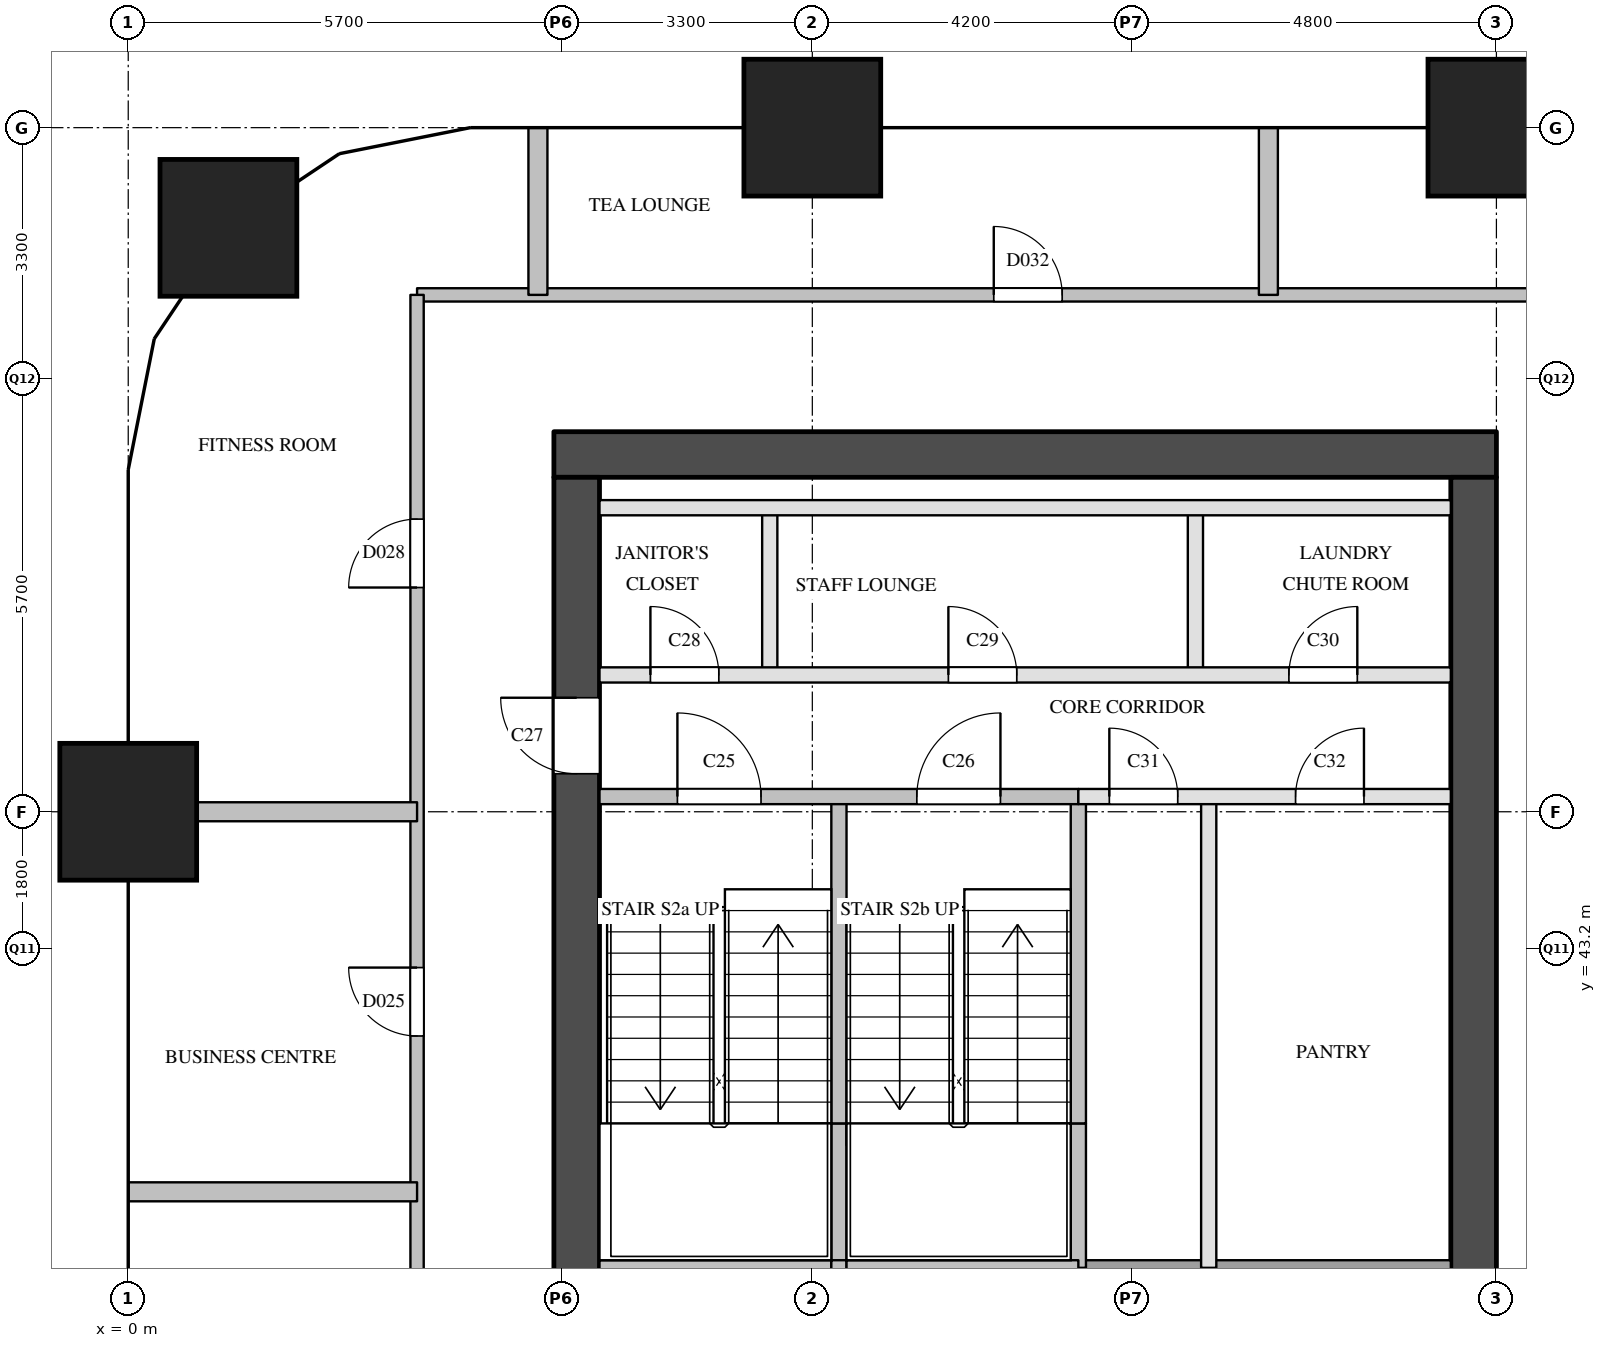
"""IFC4 building model, lengths in metres.
Left out: names, types, materials, properties, quantities, classifications, styles, units other than length and angle.
Written with IfcOpenShell. Run it as: python <this file> out.ifc"""

import sys

from ifc_helpers import new_model, si_unit, direction, frame, frame_2d, origin, origin_2d, place, context, subcontext, project, spatial, rectangle, extrude, element, fill, save


model = new_model("IFC4")
c1 = context("Model", 3, precision=1e-05, world=origin(), true_north=direction((0.0, 1.0)))
c2 = subcontext(c1, "Body", "Model", "MODEL_VIEW")
j1 = project(units=[si_unit("LENGTHUNIT", "METRE"), si_unit("PLANEANGLEUNIT", "RADIAN")], contexts=[c1])
p1 = place(None, origin())
s1 = spatial("IfcSite", under=j1, at=p1, CompositionType="ELEMENT")
p2 = place(p1, origin())
s2 = spatial("IfcBuilding", under=s1, at=p2, CompositionType="ELEMENT")
p3 = place(p2, frame((0.0, 0.0, 119.6)))
s3 = spatial("IfcBuildingStorey", under=s2, at=p3, CompositionType="ELEMENT", Elevation=119.6)
for number, where, z_axis, x_axis in (
    (1, (0.0, 45.0, 0.0), (0.0, 0.0, 1.0), (1.0, 0.0, 0.0)),
    (2, (1.318, 52.682, 0.0), (0.0, 0.0, 1.0), (1.0, 0.0, 0.0)),
    (3, (9.0, 54.0, 0.0), (0.0, 0.0, 1.0), (1.0, 0.0, 0.0)),
    (4, (18.0, 54.0, 0.0), (0.0, 0.0, 1.0), (1.0, 0.0, 0.0)),
):
    element("IfcColumn", number, at=place(p3, frame(where, z_axis=z_axis, x_axis=x_axis)), inside=s3, PredefinedType="COLUMN", context=c2, shape_type="SweptSolid", body=[
        extrude(rectangle(XDim=1.8, YDim=1.8, at=origin_2d()), origin(), (0.0, 0.0, 1.0), 3.8),
    ])
p4 = place(p3, frame((5.6, 49.7, 0.0), z_axis=(0.0, 0.0, 1.0), x_axis=(1.0, 0.0, 0.0)))
e5 = element("IfcWall", 5, at=p4, inside=s3, PredefinedType="SHEAR", context=c2, shape_type="SweptSolid", body=[
    extrude(rectangle(XDim=12.4, YDim=0.6, at=frame_2d((6.2, 0.0))), origin(), (0.0, 0.0, 1.0), 3.3),
])
p5 = place(p3, frame((5.9, 29.1, 0.0), z_axis=(0.0, 0.0, 1.0), x_axis=(0.0, 1.0, 0.0)))
e6 = element("IfcWall", 6, at=p5, inside=s3, PredefinedType="SHEAR", context=c2, shape_type="SweptSolid", body=[
    extrude(rectangle(XDim=20.3, YDim=0.6, at=frame_2d((10.15, 0.0))), origin(), (0.0, 0.0, 1.0), 3.3),
])
p6 = place(p5, frame((3.6, 0.0, 0.0)))
e7 = element("IfcOpeningElement", 7, at=p6, cuts=e6, PredefinedType="OPENING", context=c2, shape_type="SweptSolid", body=[
    extrude(rectangle(XDim=1.8, YDim=2.1, at=frame_2d((0.9, 1.05))), frame((0.0, 0.31, 0.0), z_axis=(0.0, -1.0, 0.0), x_axis=(1.0, 0.0, 0.0)), (0.0, 0.0, 1.0), 0.62),
])
p7 = place(p5, frame((16.4, 0.0, 0.0)))
e8 = element("IfcOpeningElement", 8, at=p7, cuts=e6, PredefinedType="OPENING", context=c2, shape_type="SweptSolid", body=[
    extrude(rectangle(XDim=1.0, YDim=2.1, at=frame_2d((0.5, 1.05))), frame((0.0, 0.31, 0.0), z_axis=(0.0, -1.0, 0.0), x_axis=(1.0, 0.0, 0.0)), (0.0, 0.0, 1.0), 0.62),
])
p8 = place(p3, frame((17.7, 29.1, 0.0), z_axis=(0.0, 0.0, 1.0), x_axis=(0.0, 1.0, 0.0)))
e9 = element("IfcWall", 9, at=p8, inside=s3, PredefinedType="SHEAR", context=c2, shape_type="SweptSolid", body=[
    extrude(rectangle(XDim=20.3, YDim=0.6, at=frame_2d((10.15, 0.0))), origin(), (0.0, 0.0, 1.0), 3.3),
])
p9 = place(p8, frame((1.25, 0.0, 0.0)))
e10 = element("IfcOpeningElement", 10, at=p9, cuts=e9, PredefinedType="OPENING", context=c2, shape_type="SweptSolid", body=[
    extrude(rectangle(XDim=0.7, YDim=2.1, at=frame_2d((0.35, 1.05))), frame((0.0, 0.31, 0.0), z_axis=(0.0, -1.0, 0.0), x_axis=(1.0, 0.0, 0.0)), (0.0, 0.0, 1.0), 0.62),
])
p10 = place(p8, frame((7.05, 0.0, 0.0)))
e11 = element("IfcOpeningElement", 11, at=p10, cuts=e9, PredefinedType="OPENING", context=c2, shape_type="SweptSolid", body=[
    extrude(rectangle(XDim=0.7, YDim=2.1, at=frame_2d((0.35, 1.05))), frame((0.0, 0.31, 0.0), z_axis=(0.0, -1.0, 0.0), x_axis=(1.0, 0.0, 0.0)), (0.0, 0.0, 1.0), 0.62),
])
p11 = place(p3, frame((8.44, 46.8, 0.0), z_axis=(0.0, 0.0, 1.0), x_axis=(0.0, 1.0, 0.0)))
e12 = element("IfcWall", 12, at=p11, inside=s3, PredefinedType="PARTITIONING", context=c2, shape_type="SweptSolid", body=[
    extrude(rectangle(XDim=2.2, YDim=0.2, at=frame_2d((1.1, 0.0))), origin(), (0.0, 0.0, 1.0), 3.3),
])
p12 = place(p3, frame((9.35, 39.0, 0.0), z_axis=(0.0, 0.0, 1.0), x_axis=(0.0, 1.0, 0.0)))
e13 = element("IfcWall", 13, at=p12, inside=s3, PredefinedType="SOLIDWALL", context=c2, shape_type="SweptSolid", body=[
    extrude(rectangle(XDim=1.9, YDim=0.2, at=frame_2d((0.95, 0.0))), origin(), (0.0, 0.0, 1.0), 3.3),
])
p13 = place(p3, frame((9.35, 40.9, 0.0), z_axis=(0.0, 0.0, 1.0), x_axis=(0.0, 1.0, 0.0)))
e14 = element("IfcWall", 14, at=p13, inside=s3, PredefinedType="SOLIDWALL", context=c2, shape_type="SweptSolid", body=[
    extrude(rectangle(XDim=4.3, YDim=0.2, at=frame_2d((2.15, 0.0))), origin(), (0.0, 0.0, 1.0), 3.3),
])
p14 = place(p3, frame((12.5, 39.0, 0.0), z_axis=(0.0, 0.0, 1.0), x_axis=(0.0, 1.0, 0.0)))
e15 = element("IfcWall", 15, at=p14, inside=s3, PredefinedType="SOLIDWALL", context=c2, shape_type="SweptSolid", body=[
    extrude(rectangle(XDim=1.9, YDim=0.2, at=frame_2d((0.95, 0.0))), origin(), (0.0, 0.0, 1.0), 3.3),
])
p15 = place(p3, frame((12.5, 40.9, 0.0), z_axis=(0.0, 0.0, 1.0), x_axis=(0.0, 1.0, 0.0)))
e16 = element("IfcWall", 16, at=p15, inside=s3, PredefinedType="SOLIDWALL", context=c2, shape_type="SweptSolid", body=[
    extrude(rectangle(XDim=4.3, YDim=0.2, at=frame_2d((2.15, 0.0))), origin(), (0.0, 0.0, 1.0), 3.3),
])
p16 = place(p3, frame((14.04, 46.8, 0.0), z_axis=(0.0, 0.0, 1.0), x_axis=(0.0, 1.0, 0.0)))
e17 = element("IfcWall", 17, at=p16, inside=s3, PredefinedType="PARTITIONING", context=c2, shape_type="SweptSolid", body=[
    extrude(rectangle(XDim=2.2, YDim=0.2, at=frame_2d((1.1, 0.0))), origin(), (0.0, 0.0, 1.0), 3.3),
])
p17 = place(p3, frame((14.215, 39.0, 0.0), z_axis=(0.0, 0.0, 1.0), x_axis=(0.0, 1.0, 0.0)))
e18 = element("IfcWall", 18, at=p17, inside=s3, PredefinedType="PARTITIONING", context=c2, shape_type="SweptSolid", body=[
    extrude(rectangle(XDim=6.2, YDim=0.2, at=frame_2d((3.1, 0.0))), origin(), (0.0, 0.0, 1.0), 3.3),
])
p18 = place(p3, frame((12.5, 39.0, 0.0), z_axis=(0.0, 0.0, 1.0), x_axis=(1.0, 0.0, 0.0)))
e19 = element("IfcWall", 19, at=p18, inside=s3, PredefinedType="SOLIDWALL", context=c2, shape_type="SweptSolid", body=[
    extrude(rectangle(XDim=4.9, YDim=0.2, at=frame_2d((2.45, 0.0))), origin(), (0.0, 0.0, 1.0), 3.3),
])
p19 = place(p3, frame((6.2, 39.0, 0.0), z_axis=(0.0, 0.0, 1.0), x_axis=(1.0, 0.0, 0.0)))
e20 = element("IfcWall", 20, at=p19, inside=s3, PredefinedType="SOLIDWALL", context=c2, shape_type="SweptSolid", body=[
    extrude(rectangle(XDim=3.05, YDim=0.2, at=frame_2d((1.525, 0.0))), origin(), (0.0, 0.0, 1.0), 3.3),
])
p20 = place(p3, frame((9.25, 39.0, 0.0), z_axis=(0.0, 0.0, 1.0), x_axis=(1.0, 0.0, 0.0)))
e21 = element("IfcWall", 21, at=p20, inside=s3, PredefinedType="SOLIDWALL", context=c2, shape_type="SweptSolid", body=[
    extrude(rectangle(XDim=0.2, YDim=0.2, at=frame_2d((0.1, 0.0))), origin(), (0.0, 0.0, 1.0), 3.3),
])
p21 = place(p3, frame((9.45, 39.0, 0.0), z_axis=(0.0, 0.0, 1.0), x_axis=(1.0, 0.0, 0.0)))
e22 = element("IfcWall", 22, at=p21, inside=s3, PredefinedType="SOLIDWALL", context=c2, shape_type="SweptSolid", body=[
    extrude(rectangle(XDim=3.05, YDim=0.2, at=frame_2d((1.525, 0.0))), origin(), (0.0, 0.0, 1.0), 3.3),
])
p22 = place(p3, frame((12.5, 45.2, 0.0), z_axis=(0.0, 0.0, 1.0), x_axis=(1.0, 0.0, 0.0)))
e23 = element("IfcWall", 23, at=p22, inside=s3, PredefinedType="PARTITIONING", context=c2, shape_type="SweptSolid", body=[
    extrude(rectangle(XDim=4.9, YDim=0.2, at=frame_2d((2.45, 0.0))), origin(), (0.0, 0.0, 1.0), 3.3),
])
p23 = place(p22, frame((0.407, 0.0, 0.0)))
e24 = element("IfcOpeningElement", 24, at=p23, cuts=e23, PredefinedType="OPENING", context=c2, shape_type="SweptSolid", body=[
    extrude(rectangle(XDim=0.9, YDim=2.1, at=frame_2d((0.45, 1.05))), frame((0.0, 0.11, 0.0), z_axis=(0.0, -1.0, 0.0), x_axis=(1.0, 0.0, 0.0)), (0.0, 0.0, 1.0), 0.22),
])
p24 = place(p22, frame((2.857, 0.0, 0.0)))
e25 = element("IfcOpeningElement", 25, at=p24, cuts=e23, PredefinedType="OPENING", context=c2, shape_type="SweptSolid", body=[
    extrude(rectangle(XDim=0.9, YDim=2.1, at=frame_2d((0.45, 1.05))), frame((0.0, 0.11, 0.0), z_axis=(0.0, -1.0, 0.0), x_axis=(1.0, 0.0, 0.0)), (0.0, 0.0, 1.0), 0.22),
])
p25 = place(p3, frame((6.2, 45.2, 0.0), z_axis=(0.0, 0.0, 1.0), x_axis=(1.0, 0.0, 0.0)))
e26 = element("IfcWall", 26, at=p25, inside=s3, PredefinedType="SOLIDWALL", context=c2, shape_type="SweptSolid", body=[
    extrude(rectangle(XDim=6.3, YDim=0.2, at=frame_2d((3.15, 0.0))), origin(), (0.0, 0.0, 1.0), 3.3),
])
p26 = place(p25, frame((1.025, 0.0, 0.0)))
e27 = element("IfcOpeningElement", 27, at=p26, cuts=e26, PredefinedType="OPENING", context=c2, shape_type="SweptSolid", body=[
    extrude(rectangle(XDim=1.1, YDim=2.1, at=frame_2d((0.55, 1.05))), frame((0.0, 0.11, 0.0), z_axis=(0.0, -1.0, 0.0), x_axis=(1.0, 0.0, 0.0)), (0.0, 0.0, 1.0), 0.22),
])
p27 = place(p25, frame((4.175, 0.0, 0.0)))
e28 = element("IfcOpeningElement", 28, at=p27, cuts=e26, PredefinedType="OPENING", context=c2, shape_type="SweptSolid", body=[
    extrude(rectangle(XDim=1.1, YDim=2.1, at=frame_2d((0.55, 1.05))), frame((0.0, 0.11, 0.0), z_axis=(0.0, -1.0, 0.0), x_axis=(1.0, 0.0, 0.0)), (0.0, 0.0, 1.0), 0.22),
])
p28 = place(p3, frame((6.2, 46.8, 0.0), z_axis=(0.0, 0.0, 1.0), x_axis=(1.0, 0.0, 0.0)))
e29 = element("IfcWall", 29, at=p28, inside=s3, PredefinedType="PARTITIONING", context=c2, shape_type="SweptSolid", body=[
    extrude(rectangle(XDim=11.2, YDim=0.2, at=frame_2d((5.6, 0.0))), origin(), (0.0, 0.0, 1.0), 3.3),
])
p29 = place(p28, frame((0.67, 0.0, 0.0)))
e30 = element("IfcOpeningElement", 30, at=p29, cuts=e29, PredefinedType="OPENING", context=c2, shape_type="SweptSolid", body=[
    extrude(rectangle(XDim=0.9, YDim=2.1, at=frame_2d((0.45, 1.05))), frame((0.0, 0.11, 0.0), z_axis=(0.0, -1.0, 0.0), x_axis=(1.0, 0.0, 0.0)), (0.0, 0.0, 1.0), 0.22),
])
p30 = place(p28, frame((4.59, 0.0, 0.0)))
e31 = element("IfcOpeningElement", 31, at=p30, cuts=e29, PredefinedType="OPENING", context=c2, shape_type="SweptSolid", body=[
    extrude(rectangle(XDim=0.9, YDim=2.1, at=frame_2d((0.45, 1.05))), frame((0.0, 0.11, 0.0), z_axis=(0.0, -1.0, 0.0), x_axis=(1.0, 0.0, 0.0)), (0.0, 0.0, 1.0), 0.22),
])
p31 = place(p28, frame((9.07, 0.0, 0.0)))
e32 = element("IfcOpeningElement", 32, at=p31, cuts=e29, PredefinedType="OPENING", context=c2, shape_type="SweptSolid", body=[
    extrude(rectangle(XDim=0.9, YDim=2.1, at=frame_2d((0.45, 1.05))), frame((0.0, 0.11, 0.0), z_axis=(0.0, -1.0, 0.0), x_axis=(1.0, 0.0, 0.0)), (0.0, 0.0, 1.0), 0.22),
])
p32 = place(p3, frame((6.2, 49.0, 0.0), z_axis=(0.0, 0.0, 1.0), x_axis=(1.0, 0.0, 0.0)))
e33 = element("IfcWall", 33, at=p32, inside=s3, PredefinedType="PARTITIONING", context=c2, shape_type="SweptSolid", body=[
    extrude(rectangle(XDim=11.2, YDim=0.2, at=frame_2d((5.6, 0.0))), origin(), (0.0, 0.0, 1.0), 3.3),
])
p33 = place(p3, frame((3.8, 51.8, 0.0), z_axis=(0.0, 0.0, 1.0), x_axis=(1.0, 0.0, 0.0)))
e34 = element("IfcWall", 34, at=p33, inside=s3, PredefinedType="PARTITIONING", context=c2, shape_type="SweptSolid", body=[
    extrude(rectangle(XDim=16.0, YDim=0.175, at=frame_2d((8.0, 0.0))), origin(), (0.0, 0.0, 1.0), 3.3),
])
p34 = place(p33, frame((7.587, 0.0, 0.0)))
e35 = element("IfcOpeningElement", 35, at=p34, cuts=e34, PredefinedType="OPENING", context=c2, shape_type="SweptSolid", body=[
    extrude(rectangle(XDim=0.9, YDim=2.1, at=frame_2d((0.45, 1.05))), frame((0.0, 0.097, 0.0), z_axis=(0.0, -1.0, 0.0), x_axis=(1.0, 0.0, 0.0)), (0.0, 0.0, 1.0), 0.195),
])
p35 = place(p3, frame((3.8, 28.5, 0.0), z_axis=(0.0, 0.0, 1.0), x_axis=(0.0, 1.0, 0.0)))
e36 = element("IfcWall", 36, at=p35, inside=s3, PredefinedType="PARTITIONING", context=c2, shape_type="SweptSolid", body=[
    extrude(rectangle(XDim=23.3, YDim=0.175, at=frame_2d((11.65, 0.0))), origin(), (0.0, 0.0, 1.0), 3.3),
])
p36 = place(p35, frame((5.3, 0.0, 0.0)))
e37 = element("IfcOpeningElement", 37, at=p36, cuts=e36, PredefinedType="OPENING", context=c2, shape_type="SweptSolid", body=[
    extrude(rectangle(XDim=0.9, YDim=2.1, at=frame_2d((0.45, 1.05))), frame((0.0, 0.097, 0.0), z_axis=(0.0, -1.0, 0.0), x_axis=(1.0, 0.0, 0.0)), (0.0, 0.0, 1.0), 0.195),
])
p37 = place(p35, frame((13.55, 0.0, 0.0)))
e38 = element("IfcOpeningElement", 38, at=p37, cuts=e36, PredefinedType="OPENING", context=c2, shape_type="SweptSolid", body=[
    extrude(rectangle(XDim=0.9, YDim=2.1, at=frame_2d((0.45, 1.05))), frame((0.0, 0.097, 0.0), z_axis=(0.0, -1.0, 0.0), x_axis=(1.0, 0.0, 0.0)), (0.0, 0.0, 1.0), 0.195),
])
p38 = place(p35, frame((19.45, 0.0, 0.0)))
e39 = element("IfcOpeningElement", 39, at=p38, cuts=e36, PredefinedType="OPENING", context=c2, shape_type="SweptSolid", body=[
    extrude(rectangle(XDim=0.9, YDim=2.1, at=frame_2d((0.45, 1.05))), frame((0.0, 0.097, 0.0), z_axis=(0.0, -1.0, 0.0), x_axis=(1.0, 0.0, 0.0)), (0.0, 0.0, 1.0), 0.195),
])
p39 = place(p3, frame((0.0, 40.0, 0.0), z_axis=(0.0, 0.0, 1.0), x_axis=(1.0, 0.0, 0.0)))
e40 = element("IfcWall", 40, at=p39, inside=s3, PredefinedType="PARTITIONING", context=c2, shape_type="SweptSolid", body=[
    extrude(rectangle(XDim=3.8, YDim=0.25, at=frame_2d((1.9, 0.0))), origin(), (0.0, 0.0, 1.0), 2.3),
])
p40 = place(p3, frame((0.0, 45.0, 0.0), z_axis=(0.0, 0.0, 1.0), x_axis=(1.0, 0.0, 0.0)))
e41 = element("IfcWall", 41, at=p40, inside=s3, PredefinedType="PARTITIONING", context=c2, shape_type="SweptSolid", body=[
    extrude(rectangle(XDim=3.8, YDim=0.25, at=frame_2d((1.9, 0.0))), origin(), (0.0, 0.0, 1.0), 3.3),
])
for number, where, z_axis, x_axis in (
    (42, (5.39, 51.8, 0.0), (0.0, 0.0, 1.0), (0.0, 1.0, 0.0)),
    (43, (15.0, 51.8, 0.0), (0.0, 0.0, 1.0), (0.0, 1.0, 0.0)),
):
    element("IfcWall", number, at=place(p3, frame(where, z_axis=z_axis, x_axis=x_axis)), inside=s3, PredefinedType="PARTITIONING", context=c2, shape_type="SweptSolid", body=[
        extrude(rectangle(XDim=2.2, YDim=0.25, at=frame_2d((1.1, 0.0))), origin(), (0.0, 0.0, 1.0), 2.3),
    ])
p41 = place(p26, origin())
e44 = element("IfcDoor", 44, at=p41, inside=s3, OperationType="SINGLE_SWING_LEFT", PredefinedType="DOOR", context=c2, shape_type="SweptSolid", body=[
    extrude(rectangle(XDim=1.1, YDim=2.1, at=frame_2d((0.55, 1.05))), frame((0.0, 0.025, 0.0), z_axis=(0.0, -1.0, 0.0), x_axis=(1.0, 0.0, 0.0)), (0.0, 0.0, 1.0), 0.05),
])
fill(e27, e44)
p42 = place(p27, origin())
e45 = element("IfcDoor", 45, at=p42, inside=s3, OperationType="SINGLE_SWING_RIGHT", PredefinedType="DOOR", context=c2, shape_type="SweptSolid", body=[
    extrude(rectangle(XDim=1.1, YDim=2.1, at=frame_2d((0.55, 1.05))), frame((0.0, 0.025, 0.0), z_axis=(0.0, -1.0, 0.0), x_axis=(1.0, 0.0, 0.0)), (0.0, 0.0, 1.0), 0.05),
])
fill(e28, e45)
p43 = place(p7, origin())
e46 = element("IfcDoor", 46, at=p43, inside=s3, OperationType="SINGLE_SWING_RIGHT", PredefinedType="DOOR", context=c2, shape_type="SweptSolid", body=[
    extrude(rectangle(XDim=1.0, YDim=2.1, at=frame_2d((0.5, 1.05))), frame((0.0, 0.025, 0.0), z_axis=(0.0, -1.0, 0.0), x_axis=(1.0, 0.0, 0.0)), (0.0, 0.0, 1.0), 0.05),
])
fill(e8, e46)
p44 = place(p29, origin())
e47 = element("IfcDoor", 47, at=p44, inside=s3, OperationType="SINGLE_SWING_LEFT", PredefinedType="DOOR", context=c2, shape_type="SweptSolid", body=[
    extrude(rectangle(XDim=0.9, YDim=2.1, at=frame_2d((0.45, 1.05))), frame((0.0, 0.025, 0.0), z_axis=(0.0, -1.0, 0.0), x_axis=(1.0, 0.0, 0.0)), (0.0, 0.0, 1.0), 0.05),
])
fill(e30, e47)
p45 = place(p30, origin())
e48 = element("IfcDoor", 48, at=p45, inside=s3, OperationType="SINGLE_SWING_LEFT", PredefinedType="DOOR", context=c2, shape_type="SweptSolid", body=[
    extrude(rectangle(XDim=0.9, YDim=2.1, at=frame_2d((0.45, 1.05))), frame((0.0, 0.025, 0.0), z_axis=(0.0, -1.0, 0.0), x_axis=(1.0, 0.0, 0.0)), (0.0, 0.0, 1.0), 0.05),
])
fill(e31, e48)
p46 = place(p31, origin())
e49 = element("IfcDoor", 49, at=p46, inside=s3, OperationType="SINGLE_SWING_RIGHT", PredefinedType="DOOR", context=c2, shape_type="SweptSolid", body=[
    extrude(rectangle(XDim=0.9, YDim=2.1, at=frame_2d((0.45, 1.05))), frame((0.0, 0.025, 0.0), z_axis=(0.0, -1.0, 0.0), x_axis=(1.0, 0.0, 0.0)), (0.0, 0.0, 1.0), 0.05),
])
fill(e32, e49)
p47 = place(p23, origin())
e50 = element("IfcDoor", 50, at=p47, inside=s3, OperationType="SINGLE_SWING_LEFT", PredefinedType="DOOR", context=c2, shape_type="SweptSolid", body=[
    extrude(rectangle(XDim=0.9, YDim=2.1, at=frame_2d((0.45, 1.05))), frame((0.0, 0.025, 0.0), z_axis=(0.0, -1.0, 0.0), x_axis=(1.0, 0.0, 0.0)), (0.0, 0.0, 1.0), 0.05),
])
fill(e24, e50)
p48 = place(p24, origin())
e51 = element("IfcDoor", 51, at=p48, inside=s3, OperationType="SINGLE_SWING_RIGHT", PredefinedType="DOOR", context=c2, shape_type="SweptSolid", body=[
    extrude(rectangle(XDim=0.9, YDim=2.1, at=frame_2d((0.45, 1.05))), frame((0.0, 0.025, 0.0), z_axis=(0.0, -1.0, 0.0), x_axis=(1.0, 0.0, 0.0)), (0.0, 0.0, 1.0), 0.05),
])
fill(e25, e51)
p49 = place(p37, origin())
e52 = element("IfcDoor", 52, at=p49, inside=s3, OperationType="SINGLE_SWING_RIGHT", PredefinedType="DOOR", context=c2, shape_type="SweptSolid", body=[
    extrude(rectangle(XDim=0.9, YDim=2.1, at=frame_2d((0.45, 1.05))), frame((0.0, 0.025, 0.0), z_axis=(0.0, -1.0, 0.0), x_axis=(1.0, 0.0, 0.0)), (0.0, 0.0, 1.0), 0.05),
])
fill(e38, e52)
p50 = place(p38, origin())
e53 = element("IfcDoor", 53, at=p50, inside=s3, OperationType="SINGLE_SWING_LEFT", PredefinedType="DOOR", context=c2, shape_type="SweptSolid", body=[
    extrude(rectangle(XDim=0.9, YDim=2.1, at=frame_2d((0.45, 1.05))), frame((0.0, 0.025, 0.0), z_axis=(0.0, -1.0, 0.0), x_axis=(1.0, 0.0, 0.0)), (0.0, 0.0, 1.0), 0.05),
])
fill(e39, e53)
p51 = place(p34, origin())
e54 = element("IfcDoor", 54, at=p51, inside=s3, OperationType="SINGLE_SWING_LEFT", PredefinedType="DOOR", context=c2, shape_type="SweptSolid", body=[
    extrude(rectangle(XDim=0.9, YDim=2.1, at=frame_2d((0.45, 1.05))), frame((0.0, 0.025, 0.0), z_axis=(0.0, -1.0, 0.0), x_axis=(1.0, 0.0, 0.0)), (0.0, 0.0, 1.0), 0.05),
])
fill(e35, e54)
save(model, sys.argv[1])
